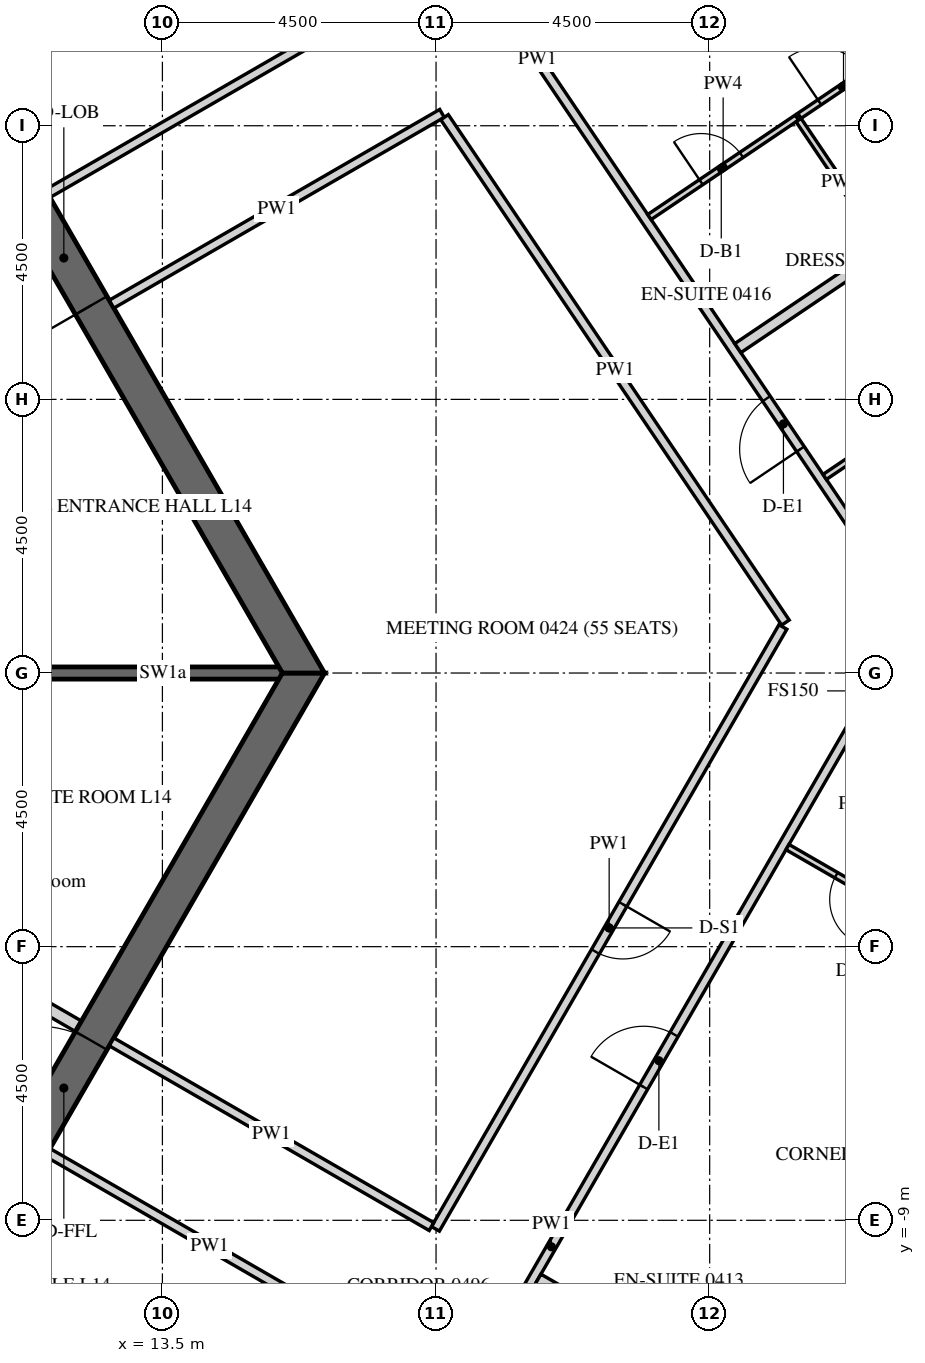
"""IFC4 building model, lengths in metres.
Left out: names, types, materials, properties, quantities, classifications, styles, units other than length and angle.
Written with IfcOpenShell. Run it as: python <this file> out.ifc"""

import sys

from ifc_helpers import new_model, si_unit, direction, frame, frame_2d, origin, place, context, subcontext, project, spatial, polyline, rectangle, outline, extrude, element, fill, save


model = new_model("IFC4")
c1 = context("Model", 3, precision=1e-05, world=origin(), true_north=direction((0.0, 1.0)))
c2 = subcontext(c1, "Body", "Model", "MODEL_VIEW")
j1 = project(units=[si_unit("LENGTHUNIT", "METRE"), si_unit("PLANEANGLEUNIT", "RADIAN")], contexts=[c1])
p1 = place(None, origin())
s1 = spatial("IfcSite", under=j1, at=p1, CompositionType="ELEMENT")
p2 = place(p1, origin())
s2 = spatial("IfcBuilding", under=s1, at=p2, CompositionType="ELEMENT")
p3 = place(p2, frame((0.0, 0.0, 68.7)))
s3 = spatial("IfcBuildingStorey", under=s2, at=p3, CompositionType="ELEMENT", Elevation=68.7)
p4 = place(p3, frame((18.83, -26.835, -0.15), z_axis=(0.0, 0.0, 1.0), x_axis=(0.500003800416, 0.866023209602, 0.0)))
e1 = element("IfcWall", 1, at=p4, inside=s3, PredefinedType="SOLIDWALL", context=c2, shape_type="SweptSolid", body=[
    extrude(outline(polyline([(-0.022, -0.275), (30.097, -0.275), (30.045, 0.275), (0.022, 0.275), (-0.022, -0.275)])), origin(), (0.0, 0.0, 1.0), 3.9),
])
p5 = place(p4, frame((1.236, 0.0, 1.05)))
e2 = element("IfcOpeningElement", 2, at=p5, cuts=e1, PredefinedType="OPENING", context=c2, shape_type="SweptSolid", body=[
    extrude(rectangle(XDim=2.4, YDim=2.4, at=frame_2d((1.2, 1.2))), frame((0.0, 0.285, 0.0), z_axis=(0.0, -1.0, 0.0), x_axis=(1.0, 0.0, 0.0)), (0.0, 0.0, 1.0), 0.57),
])
p6 = place(p4, frame((4.835, 0.0, 1.05)))
e3 = element("IfcOpeningElement", 3, at=p6, cuts=e1, PredefinedType="OPENING", context=c2, shape_type="SweptSolid", body=[
    extrude(rectangle(XDim=2.4, YDim=2.4, at=frame_2d((1.2, 1.2))), frame((0.0, 0.285, 0.0), z_axis=(0.0, -1.0, 0.0), x_axis=(1.0, 0.0, 0.0)), (0.0, 0.0, 1.0), 0.57),
])
p7 = place(p4, frame((8.436, 0.0, 1.05)))
e4 = element("IfcOpeningElement", 4, at=p7, cuts=e1, PredefinedType="OPENING", context=c2, shape_type="SweptSolid", body=[
    extrude(rectangle(XDim=2.4, YDim=2.4, at=frame_2d((1.2, 1.2))), frame((0.0, 0.285, 0.0), z_axis=(0.0, -1.0, 0.0), x_axis=(1.0, 0.0, 0.0)), (0.0, 0.0, 1.0), 0.57),
])
p8 = place(p4, frame((12.035, 0.0, 1.05)))
e5 = element("IfcOpeningElement", 5, at=p8, cuts=e1, PredefinedType="OPENING", context=c2, shape_type="SweptSolid", body=[
    extrude(rectangle(XDim=2.4, YDim=2.4, at=frame_2d((1.2, 1.2))), frame((0.0, 0.285, 0.0), z_axis=(0.0, -1.0, 0.0), x_axis=(1.0, 0.0, 0.0)), (0.0, 0.0, 1.0), 0.57),
])
p9 = place(p4, frame((15.635, 0.0, 1.05)))
e6 = element("IfcOpeningElement", 6, at=p9, cuts=e1, PredefinedType="OPENING", context=c2, shape_type="SweptSolid", body=[
    extrude(rectangle(XDim=2.4, YDim=2.4, at=frame_2d((1.2, 1.2))), frame((0.0, 0.285, 0.0), z_axis=(0.0, -1.0, 0.0), x_axis=(1.0, 0.0, 0.0)), (0.0, 0.0, 1.0), 0.57),
])
p10 = place(p4, frame((19.236, 0.0, 1.05)))
e7 = element("IfcOpeningElement", 7, at=p10, cuts=e1, PredefinedType="OPENING", context=c2, shape_type="SweptSolid", body=[
    extrude(rectangle(XDim=2.4, YDim=2.4, at=frame_2d((1.2, 1.2))), frame((0.0, 0.285, 0.0), z_axis=(0.0, -1.0, 0.0), x_axis=(1.0, 0.0, 0.0)), (0.0, 0.0, 1.0), 0.57),
])
p11 = place(p4, frame((22.835, 0.0, 1.05)))
e8 = element("IfcOpeningElement", 8, at=p11, cuts=e1, PredefinedType="OPENING", context=c2, shape_type="SweptSolid", body=[
    extrude(rectangle(XDim=2.4, YDim=2.4, at=frame_2d((1.2, 1.2))), frame((0.0, 0.285, 0.0), z_axis=(0.0, -1.0, 0.0), x_axis=(1.0, 0.0, 0.0)), (0.0, 0.0, 1.0), 0.57),
])
p12 = place(p4, frame((26.436, 0.0, 1.05)))
e9 = element("IfcOpeningElement", 9, at=p12, cuts=e1, PredefinedType="OPENING", context=c2, shape_type="SweptSolid", body=[
    extrude(rectangle(XDim=2.4, YDim=2.4, at=frame_2d((1.2, 1.2))), frame((0.0, 0.285, 0.0), z_axis=(0.0, -1.0, 0.0), x_axis=(1.0, 0.0, 0.0)), (0.0, 0.0, 1.0), 0.57),
])
p13 = place(p3, frame((33.728, 3.153, -0.15), z_axis=(0.0, 0.0, 1.0), x_axis=(-0.559192411416, 0.82903790445, 0.0)))
e10 = element("IfcWall", 10, at=p13, inside=s3, PredefinedType="SOLIDWALL", context=c2, shape_type="SweptSolid", body=[
    extrude(outline(polyline([(-0.026, -0.275), (30.093, -0.275), (30.048, 0.275), (0.026, 0.275), (-0.026, -0.275)])), origin(), (0.0, 0.0, 1.0), 3.9),
])
p14 = place(p13, frame((1.236, 0.0, 1.05)))
e11 = element("IfcOpeningElement", 11, at=p14, cuts=e10, PredefinedType="OPENING", context=c2, shape_type="SweptSolid", body=[
    extrude(rectangle(XDim=2.4, YDim=2.4, at=frame_2d((1.2, 1.2))), frame((0.0, 0.285, 0.0), z_axis=(0.0, -1.0, 0.0), x_axis=(1.0, 0.0, 0.0)), (0.0, 0.0, 1.0), 0.57),
])
p15 = place(p13, frame((4.835, 0.0, 1.05)))
e12 = element("IfcOpeningElement", 12, at=p15, cuts=e10, PredefinedType="OPENING", context=c2, shape_type="SweptSolid", body=[
    extrude(rectangle(XDim=2.4, YDim=2.4, at=frame_2d((1.2, 1.2))), frame((0.0, 0.285, 0.0), z_axis=(0.0, -1.0, 0.0), x_axis=(1.0, 0.0, 0.0)), (0.0, 0.0, 1.0), 0.57),
])
p16 = place(p13, frame((8.436, 0.0, 1.05)))
e13 = element("IfcOpeningElement", 13, at=p16, cuts=e10, PredefinedType="OPENING", context=c2, shape_type="SweptSolid", body=[
    extrude(rectangle(XDim=2.4, YDim=2.4, at=frame_2d((1.2, 1.2))), frame((0.0, 0.285, 0.0), z_axis=(0.0, -1.0, 0.0), x_axis=(1.0, 0.0, 0.0)), (0.0, 0.0, 1.0), 0.57),
])
p17 = place(p13, frame((12.035, 0.0, 1.05)))
e14 = element("IfcOpeningElement", 14, at=p17, cuts=e10, PredefinedType="OPENING", context=c2, shape_type="SweptSolid", body=[
    extrude(rectangle(XDim=2.4, YDim=2.4, at=frame_2d((1.2, 1.2))), frame((0.0, 0.285, 0.0), z_axis=(0.0, -1.0, 0.0), x_axis=(1.0, 0.0, 0.0)), (0.0, 0.0, 1.0), 0.57),
])
p18 = place(p13, frame((15.635, 0.0, 1.05)))
e15 = element("IfcOpeningElement", 15, at=p18, cuts=e10, PredefinedType="OPENING", context=c2, shape_type="SweptSolid", body=[
    extrude(rectangle(XDim=2.4, YDim=2.4, at=frame_2d((1.2, 1.2))), frame((0.0, 0.285, 0.0), z_axis=(0.0, -1.0, 0.0), x_axis=(1.0, 0.0, 0.0)), (0.0, 0.0, 1.0), 0.57),
])
p19 = place(p13, frame((19.236, 0.0, 1.05)))
e16 = element("IfcOpeningElement", 16, at=p19, cuts=e10, PredefinedType="OPENING", context=c2, shape_type="SweptSolid", body=[
    extrude(rectangle(XDim=2.4, YDim=2.4, at=frame_2d((1.2, 1.2))), frame((0.0, 0.285, 0.0), z_axis=(0.0, -1.0, 0.0), x_axis=(1.0, 0.0, 0.0)), (0.0, 0.0, 1.0), 0.57),
])
p20 = place(p13, frame((22.835, 0.0, 1.05)))
e17 = element("IfcOpeningElement", 17, at=p20, cuts=e10, PredefinedType="OPENING", context=c2, shape_type="SweptSolid", body=[
    extrude(rectangle(XDim=2.4, YDim=2.4, at=frame_2d((1.2, 1.2))), frame((0.0, 0.285, 0.0), z_axis=(0.0, -1.0, 0.0), x_axis=(1.0, 0.0, 0.0)), (0.0, 0.0, 1.0), 0.57),
])
p21 = place(p13, frame((26.436, 0.0, 1.05)))
e18 = element("IfcOpeningElement", 18, at=p21, cuts=e10, PredefinedType="OPENING", context=c2, shape_type="SweptSolid", body=[
    extrude(rectangle(XDim=2.4, YDim=2.4, at=frame_2d((1.2, 1.2))), frame((0.0, 0.285, 0.0), z_axis=(0.0, -1.0, 0.0), x_axis=(1.0, 0.0, 0.0)), (0.0, 0.0, 1.0), 0.57),
])
p22 = place(p3, frame((7.91, -13.7, -0.15), z_axis=(0.0, 0.0, 1.0), x_axis=(0.499999880136, 0.866025472988, 0.0)))
e19 = element("IfcWall", 19, at=p22, inside=s3, PredefinedType="SHEAR", context=c2, shape_type="SweptSolid", body=[
    extrude(outline(polyline([(-0.173, -0.3), (15.993, -0.3), (15.646, 0.3), (0.173, 0.3), (-0.173, -0.3)])), origin(), (0.0, 0.0, 1.0), 3.9),
])
p23 = place(p22, frame((7.039, 0.0, 0.15)))
e20 = element("IfcOpeningElement", 20, at=p23, cuts=e19, PredefinedType="OPENING", context=c2, shape_type="SweptSolid", body=[
    extrude(rectangle(XDim=1.8, YDim=2.4, at=frame_2d((0.9, 1.2))), frame((0.0, 0.31, 0.0), z_axis=(0.0, -1.0, 0.0), x_axis=(1.0, 0.0, 0.0)), (0.0, 0.0, 1.0), 0.62),
])
p24 = place(p3, frame((15.819, 0.0, -0.15), z_axis=(0.0, 0.0, 1.0), x_axis=(-0.499999880136, 0.866025472988, 0.0)))
e21 = element("IfcWall", 21, at=p24, inside=s3, PredefinedType="SHEAR", context=c2, shape_type="SweptSolid", body=[
    extrude(outline(polyline([(-0.173, -0.3), (15.993, -0.3), (15.646, 0.3), (0.173, 0.3), (-0.173, -0.3)])), origin(), (0.0, 0.0, 1.0), 3.9),
])
p25 = place(p24, frame((6.981, 0.0, 0.15)))
e22 = element("IfcOpeningElement", 22, at=p25, cuts=e21, PredefinedType="OPENING", context=c2, shape_type="SweptSolid", body=[
    extrude(rectangle(XDim=1.8, YDim=2.4, at=frame_2d((0.9, 1.2))), frame((0.0, 0.31, 0.0), z_axis=(0.0, -1.0, 0.0), x_axis=(1.0, 0.0, 0.0)), (0.0, 0.0, 1.0), 0.62),
])
p26 = place(p3, frame((11.547, 0.0, -0.15), z_axis=(0.0, 0.0, 1.0), x_axis=(1.0, 0.0, 0.0)))
e23 = element("IfcWall", 23, at=p26, inside=s3, PredefinedType="SHEAR", context=c2, shape_type="SweptSolid", body=[
    extrude(rectangle(XDim=3.926, YDim=0.2, at=frame_2d((1.963, 0.0))), origin(), (0.0, 0.0, 1.0), 3.9),
])
p27 = place(p3, frame((9.175, -4.109, 0.0), z_axis=(0.0, 0.0, 1.0), x_axis=(0.865989465428, -0.500062241894, 0.0)))
e24 = element("IfcWall", 24, at=p27, inside=s3, PredefinedType="PARTITIONING", context=c2, shape_type="SweptSolid", body=[
    extrude(rectangle(XDim=3.4, YDim=0.2, at=frame_2d((1.7, 0.0))), origin(), (0.0, 0.0, 1.0), 3.65),
])
p28 = place(p27, frame((1.351, 0.0, 0.0)))
e25 = element("IfcOpeningElement", 25, at=p28, cuts=e24, PredefinedType="OPENING", context=c2, shape_type="SweptSolid", body=[
    extrude(rectangle(XDim=0.9, YDim=2.1, at=frame_2d((0.45, 1.05))), frame((0.0, 0.11, 0.0), z_axis=(0.0, -1.0, 0.0), x_axis=(1.0, 0.0, 0.0)), (0.0, 0.0, 1.0), 0.22),
])
p29 = place(p3, frame((13.928, -19.775, 0.0), z_axis=(0.0, 0.0, 1.0), x_axis=(0.50000450071, 0.866022805283, 0.0)))
e26 = element("IfcWall", 26, at=p29, inside=s3, PredefinedType="PARTITIONING", context=c2, shape_type="SweptSolid", body=[
    extrude(rectangle(XDim=23.877, YDim=0.15, at=frame_2d((11.938, 0.0))), origin(), (0.0, 0.0, 1.0), 2.988),
])
p30 = place(p29, frame((3.943, 0.0, 0.0)))
e27 = element("IfcOpeningElement", 27, at=p30, cuts=e26, PredefinedType="OPENING", context=c2, shape_type="SweptSolid", body=[
    extrude(rectangle(XDim=1.0, YDim=2.1, at=frame_2d((0.5, 1.05))), frame((0.0, 0.085, 0.0), z_axis=(0.0, -1.0, 0.0), x_axis=(1.0, 0.0, 0.0)), (0.0, 0.0, 1.0), 0.17),
])
p31 = place(p29, frame((14.972, 0.0, 0.0)))
e28 = element("IfcOpeningElement", 28, at=p31, cuts=e26, PredefinedType="OPENING", context=c2, shape_type="SweptSolid", body=[
    extrude(rectangle(XDim=1.0, YDim=2.1, at=frame_2d((0.5, 1.05))), frame((0.0, 0.085, 0.0), z_axis=(0.0, -1.0, 0.0), x_axis=(1.0, 0.0, 0.0)), (0.0, 0.0, 1.0), 0.17),
])
p32 = place(p3, frame((25.821, 0.972, 0.0), z_axis=(0.0, 0.0, 1.0), x_axis=(-0.559193816298, 0.829036956845, 0.0)))
e29 = element("IfcWall", 29, at=p32, inside=s3, PredefinedType="PARTITIONING", context=c2, shape_type="SweptSolid", body=[
    extrude(rectangle(XDim=22.002, YDim=0.15, at=frame_2d((11.001, 0.0))), origin(), (0.0, 0.0, 1.0), 2.988),
])
p33 = place(p32, frame((3.269, 0.0, 0.0)))
e30 = element("IfcOpeningElement", 30, at=p33, cuts=e29, PredefinedType="OPENING", context=c2, shape_type="SweptSolid", body=[
    extrude(rectangle(XDim=1.0, YDim=2.1, at=frame_2d((0.5, 1.05))), frame((0.0, 0.085, 0.0), z_axis=(0.0, -1.0, 0.0), x_axis=(1.0, 0.0, 0.0)), (0.0, 0.0, 1.0), 0.17),
])
p34 = place(p32, frame((13.221, 0.0, 0.0)))
e31 = element("IfcOpeningElement", 31, at=p34, cuts=e29, PredefinedType="OPENING", context=c2, shape_type="SweptSolid", body=[
    extrude(rectangle(XDim=1.0, YDim=2.1, at=frame_2d((0.5, 1.05))), frame((0.0, 0.085, 0.0), z_axis=(0.0, -1.0, 0.0), x_axis=(1.0, 0.0, 0.0)), (0.0, 0.0, 1.0), 0.17),
])
p35 = place(p32, frame((20.852, 0.0, 0.0)))
e32 = element("IfcOpeningElement", 32, at=p35, cuts=e29, PredefinedType="OPENING", context=c2, shape_type="SweptSolid", body=[
    extrude(rectangle(XDim=1.0, YDim=2.1, at=frame_2d((0.5, 1.05))), frame((0.0, 0.085, 0.0), z_axis=(0.0, -1.0, 0.0), x_axis=(1.0, 0.0, 0.0)), (0.0, 0.0, 1.0), 0.17),
])
p36 = place(p3, frame((12.664, 6.066, 0.0), z_axis=(0.0, 0.0, 1.0), x_axis=(0.866036561919, 0.499980673046, 0.0)))
e33 = element("IfcWall", 33, at=p36, inside=s3, PredefinedType="PARTITIONING", context=c2, shape_type="SweptSolid", body=[
    extrude(rectangle(XDim=6.275, YDim=0.15, at=frame_2d((3.137, 0.0))), origin(), (0.0, 0.0, 1.0), 2.988),
])
p37 = place(p3, frame((18.14, 9.141, 0.0), z_axis=(0.0, 0.0, 1.0), x_axis=(0.55918799196, -0.829040885389, 0.0)))
e34 = element("IfcWall", 34, at=p37, inside=s3, PredefinedType="PARTITIONING", context=c2, shape_type="SweptSolid", body=[
    extrude(rectangle(XDim=10.025, YDim=0.15, at=frame_2d((5.013, 0.0))), origin(), (0.0, 0.0, 1.0), 2.988),
])
p38 = place(p3, frame((23.704, 0.757, 0.0), z_axis=(0.0, 0.0, 1.0), x_axis=(-0.500010297365, -0.866019458516, 0.0)))
e35 = element("IfcWall", 35, at=p38, inside=s3, PredefinedType="PARTITIONING", context=c2, shape_type="SweptSolid", body=[
    extrude(rectangle(XDim=11.429, YDim=0.15, at=frame_2d((5.714, 0.0))), origin(), (0.0, 0.0, 1.0), 2.988),
])
p39 = place(p38, frame((5.264, 0.0, 0.0)))
e36 = element("IfcOpeningElement", 36, at=p39, cuts=e35, PredefinedType="OPENING", context=c2, shape_type="SweptSolid", body=[
    extrude(rectangle(XDim=0.9, YDim=2.1, at=frame_2d((0.45, 1.05))), frame((0.0, 0.085, 0.0), z_axis=(0.0, -1.0, 0.0), x_axis=(1.0, 0.0, 0.0)), (0.0, 0.0, 1.0), 0.17),
])
p40 = place(p3, frame((17.925, -9.103, 0.0), z_axis=(0.0, 0.0, 1.0), x_axis=(-0.866013586754, 0.500020467139, 0.0)))
e37 = element("IfcWall", 37, at=p40, inside=s3, PredefinedType="PARTITIONING", context=c2, shape_type="SweptSolid", body=[
    extrude(rectangle(XDim=6.075, YDim=0.15, at=frame_2d((3.038, 0.0))), origin(), (0.0, 0.0, 1.0), 2.988),
])
p41 = place(p3, frame((11.614, -7.884, 0.0), z_axis=(0.0, 0.0, 1.0), x_axis=(0.866033542371, -0.499985903289, 0.0)))
e38 = element("IfcWall", 38, at=p41, inside=s3, PredefinedType="PARTITIONING", context=c2, shape_type="SweptSolid", body=[
    extrude(rectangle(XDim=6.15, YDim=0.15, at=frame_2d((3.075, 0.0))), origin(), (0.0, 0.0, 1.0), 2.988),
])
p42 = place(p3, frame((16.855, 10.911, 0.0), z_axis=(0.0, 0.0, 1.0), x_axis=(-0.866020343444, -0.500008764664, 0.0)))
e39 = element("IfcWall", 39, at=p42, inside=s3, PredefinedType="PARTITIONING", context=c2, shape_type="SweptSolid", body=[
    extrude(rectangle(XDim=6.053, YDim=0.15, at=frame_2d((3.026, 0.0))), origin(), (0.0, 0.0, 1.0), 2.988),
])
p43 = place(p3, frame((26.11, -13.676, 0.0), z_axis=(0.0, 0.0, 1.0), x_axis=(-0.866014745021, 0.500018461065, 0.0)))
e40 = element("IfcWall", 40, at=p43, inside=s3, PredefinedType="PARTITIONING", context=c2, shape_type="SweptSolid", body=[
    extrude(rectangle(XDim=7.425, YDim=0.18, at=frame_2d((3.712, 0.0))), origin(), (0.0, 0.0, 1.0), 2.988),
])
p44 = place(p3, frame((26.096, -4.2, 0.0), z_axis=(0.0, 0.0, 1.0), x_axis=(-0.86604424267, 0.499967368674, 0.0)))
e41 = element("IfcWall", 41, at=p44, inside=s3, PredefinedType="PARTITIONING", context=c2, shape_type="SweptSolid", body=[
    extrude(rectangle(XDim=2.675, YDim=0.1, at=frame_2d((1.337, 0.0))), origin(), (0.0, 0.0, 1.0), 2.988),
])
p45 = place(p44, frame((0.95, 0.0, 0.0)))
e42 = element("IfcOpeningElement", 42, at=p45, cuts=e41, PredefinedType="OPENING", context=c2, shape_type="SweptSolid", body=[
    extrude(rectangle(XDim=0.8, YDim=2.1, at=frame_2d((0.4, 1.05))), frame((0.0, 0.06, 0.0), z_axis=(0.0, -1.0, 0.0), x_axis=(1.0, 0.0, 0.0)), (0.0, 0.0, 1.0), 0.12),
])
p46 = place(p3, frame((24.392, 3.225, 0.0), z_axis=(0.0, 0.0, 1.0), x_axis=(0.829033436212, 0.559199035802, 0.0)))
e43 = element("IfcWall", 43, at=p46, inside=s3, PredefinedType="PARTITIONING", context=c2, shape_type="SweptSolid", body=[
    extrude(rectangle(XDim=2.925, YDim=0.1, at=frame_2d((1.462, 0.0))), origin(), (0.0, 0.0, 1.0), 2.988),
])
p47 = place(p46, frame((1.025, 0.0, 0.0)))
e44 = element("IfcOpeningElement", 44, at=p47, cuts=e43, PredefinedType="OPENING", context=c2, shape_type="SweptSolid", body=[
    extrude(rectangle(XDim=0.8, YDim=2.1, at=frame_2d((0.4, 1.05))), frame((0.0, 0.06, 0.0), z_axis=(0.0, -1.0, 0.0), x_axis=(1.0, 0.0, 0.0)), (0.0, 0.0, 1.0), 0.12),
])
p48 = place(p3, frame((29.119, 9.495, 0.0), z_axis=(0.0, 0.0, 1.0), x_axis=(-0.829038452737, -0.559191598545, 0.0)))
e45 = element("IfcWall", 45, at=p48, inside=s3, PredefinedType="PARTITIONING", context=c2, shape_type="SweptSolid", body=[
    extrude(rectangle(XDim=7.425, YDim=0.18, at=frame_2d((3.713, 0.0))), origin(), (0.0, 0.0, 1.0), 2.988),
])
p49 = place(p3, frame((21.509, 7.499, 0.0), z_axis=(0.0, 0.0, 1.0), x_axis=(0.829033436212, 0.559199035802, 0.0)))
e46 = element("IfcWall", 46, at=p49, inside=s3, PredefinedType="PARTITIONING", context=c2, shape_type="SweptSolid", body=[
    extrude(rectangle(XDim=2.925, YDim=0.1, at=frame_2d((1.462, 0.0))), origin(), (0.0, 0.0, 1.0), 2.988),
])
p50 = place(p49, frame((1.025, 0.0, 0.0)))
e47 = element("IfcOpeningElement", 47, at=p50, cuts=e46, PredefinedType="OPENING", context=c2, shape_type="SweptSolid", body=[
    extrude(rectangle(XDim=0.8, YDim=2.1, at=frame_2d((0.4, 1.05))), frame((0.0, 0.06, 0.0), z_axis=(0.0, -1.0, 0.0), x_axis=(1.0, 0.0, 0.0)), (0.0, 0.0, 1.0), 0.12),
])
p51 = place(p3, frame((23.975, 9.162, 0.0), z_axis=(0.0, 0.0, 1.0), x_axis=(0.829011970545, 0.559230858138, 0.0)))
e48 = element("IfcWall", 48, at=p51, inside=s3, PredefinedType="PARTITIONING", context=c2, shape_type="SweptSolid", body=[
    extrude(rectangle(XDim=1.75, YDim=0.1, at=frame_2d((0.875, 0.0))), origin(), (0.0, 0.0, 1.0), 2.988),
])
p52 = place(p51, frame((0.4, 0.0, 0.0)))
e49 = element("IfcOpeningElement", 49, at=p52, cuts=e48, PredefinedType="OPENING", context=c2, shape_type="SweptSolid", body=[
    extrude(rectangle(XDim=0.9, YDim=2.1, at=frame_2d((0.45, 1.05))), frame((0.0, 0.06, 0.0), z_axis=(0.0, -1.0, 0.0), x_axis=(1.0, 0.0, 0.0)), (0.0, 0.0, 1.0), 0.12),
])
p53 = place(p3, frame((25.338, 7.053, 0.0), z_axis=(0.0, 0.0, 1.0), x_axis=(-0.559249542518, 0.82899936622, 0.0)))
e50 = element("IfcWall", 50, at=p53, inside=s3, PredefinedType="PARTITIONING", context=c2, shape_type="SweptSolid", body=[
    extrude(rectangle(XDim=2.46, YDim=0.1, at=frame_2d((1.23, 0.0))), origin(), (0.0, 0.0, 1.0), 2.988),
])
p54 = place(p25, origin())
e51 = element("IfcDoor", 51, at=p54, inside=s3, OperationType="DOUBLE_DOOR_SINGLE_SWING", PredefinedType="DOOR", context=c2, shape_type="SweptSolid", body=[
    extrude(rectangle(XDim=1.8, YDim=2.4, at=frame_2d((0.9, 1.2))), frame((0.0, 0.025, 0.0), z_axis=(0.0, -1.0, 0.0), x_axis=(1.0, 0.0, 0.0)), (0.0, 0.0, 1.0), 0.05),
])
fill(e22, e51)
p55 = place(p23, origin())
e52 = element("IfcDoor", 52, at=p55, inside=s3, OperationType="DOUBLE_DOOR_SINGLE_SWING", PredefinedType="DOOR", context=c2, shape_type="SweptSolid", body=[
    extrude(rectangle(XDim=1.8, YDim=2.4, at=frame_2d((0.9, 1.2))), frame((0.0, 0.025, 0.0), z_axis=(0.0, -1.0, 0.0), x_axis=(1.0, 0.0, 0.0)), (0.0, 0.0, 1.0), 0.05),
])
fill(e20, e52)
p56 = place(p31, origin())
e53 = element("IfcDoor", 53, at=p56, inside=s3, OperationType="SINGLE_SWING_LEFT", PredefinedType="DOOR", context=c2, shape_type="SweptSolid", body=[
    extrude(rectangle(XDim=1.0, YDim=2.1, at=frame_2d((0.5, 1.05))), frame((0.0, 0.025, 0.0), z_axis=(0.0, -1.0, 0.0), x_axis=(1.0, 0.0, 0.0)), (0.0, 0.0, 1.0), 0.05),
])
fill(e28, e53)
p57 = place(p45, origin())
e54 = element("IfcDoor", 54, at=p57, inside=s3, OperationType="SINGLE_SWING_LEFT", PredefinedType="DOOR", context=c2, shape_type="SweptSolid", body=[
    extrude(rectangle(XDim=0.8, YDim=2.1, at=frame_2d((0.4, 1.05))), frame((0.0, 0.025, 0.0), z_axis=(0.0, -1.0, 0.0), x_axis=(1.0, 0.0, 0.0)), (0.0, 0.0, 1.0), 0.05),
])
fill(e42, e54)
p58 = place(p33, origin())
e55 = element("IfcDoor", 55, at=p58, inside=s3, OperationType="SINGLE_SWING_LEFT", PredefinedType="DOOR", context=c2, shape_type="SweptSolid", body=[
    extrude(rectangle(XDim=1.0, YDim=2.1, at=frame_2d((0.5, 1.05))), frame((0.0, 0.025, 0.0), z_axis=(0.0, -1.0, 0.0), x_axis=(1.0, 0.0, 0.0)), (0.0, 0.0, 1.0), 0.05),
])
fill(e30, e55)
p59 = place(p50, origin())
e56 = element("IfcDoor", 56, at=p59, inside=s3, OperationType="SINGLE_SWING_RIGHT", PredefinedType="DOOR", context=c2, shape_type="SweptSolid", body=[
    extrude(rectangle(XDim=0.8, YDim=2.1, at=frame_2d((0.4, 1.05))), frame((0.0, 0.025, 0.0), z_axis=(0.0, -1.0, 0.0), x_axis=(1.0, 0.0, 0.0)), (0.0, 0.0, 1.0), 0.05),
])
fill(e47, e56)
p60 = place(p52, origin())
e57 = element("IfcDoor", 57, at=p60, inside=s3, OperationType="SINGLE_SWING_LEFT", PredefinedType="DOOR", context=c2, shape_type="SweptSolid", body=[
    extrude(rectangle(XDim=0.9, YDim=2.1, at=frame_2d((0.45, 1.05))), frame((0.0, 0.025, 0.0), z_axis=(0.0, -1.0, 0.0), x_axis=(1.0, 0.0, 0.0)), (0.0, 0.0, 1.0), 0.05),
])
fill(e49, e57)
p61 = place(p39, origin())
e58 = element("IfcDoor", 58, at=p61, inside=s3, OperationType="SINGLE_SWING_LEFT", PredefinedType="DOOR", context=c2, shape_type="SweptSolid", body=[
    extrude(rectangle(XDim=0.9, YDim=2.1, at=frame_2d((0.45, 1.05))), frame((0.0, 0.025, 0.0), z_axis=(0.0, -1.0, 0.0), x_axis=(1.0, 0.0, 0.0)), (0.0, 0.0, 1.0), 0.05),
])
fill(e36, e58)
save(model, sys.argv[1])
